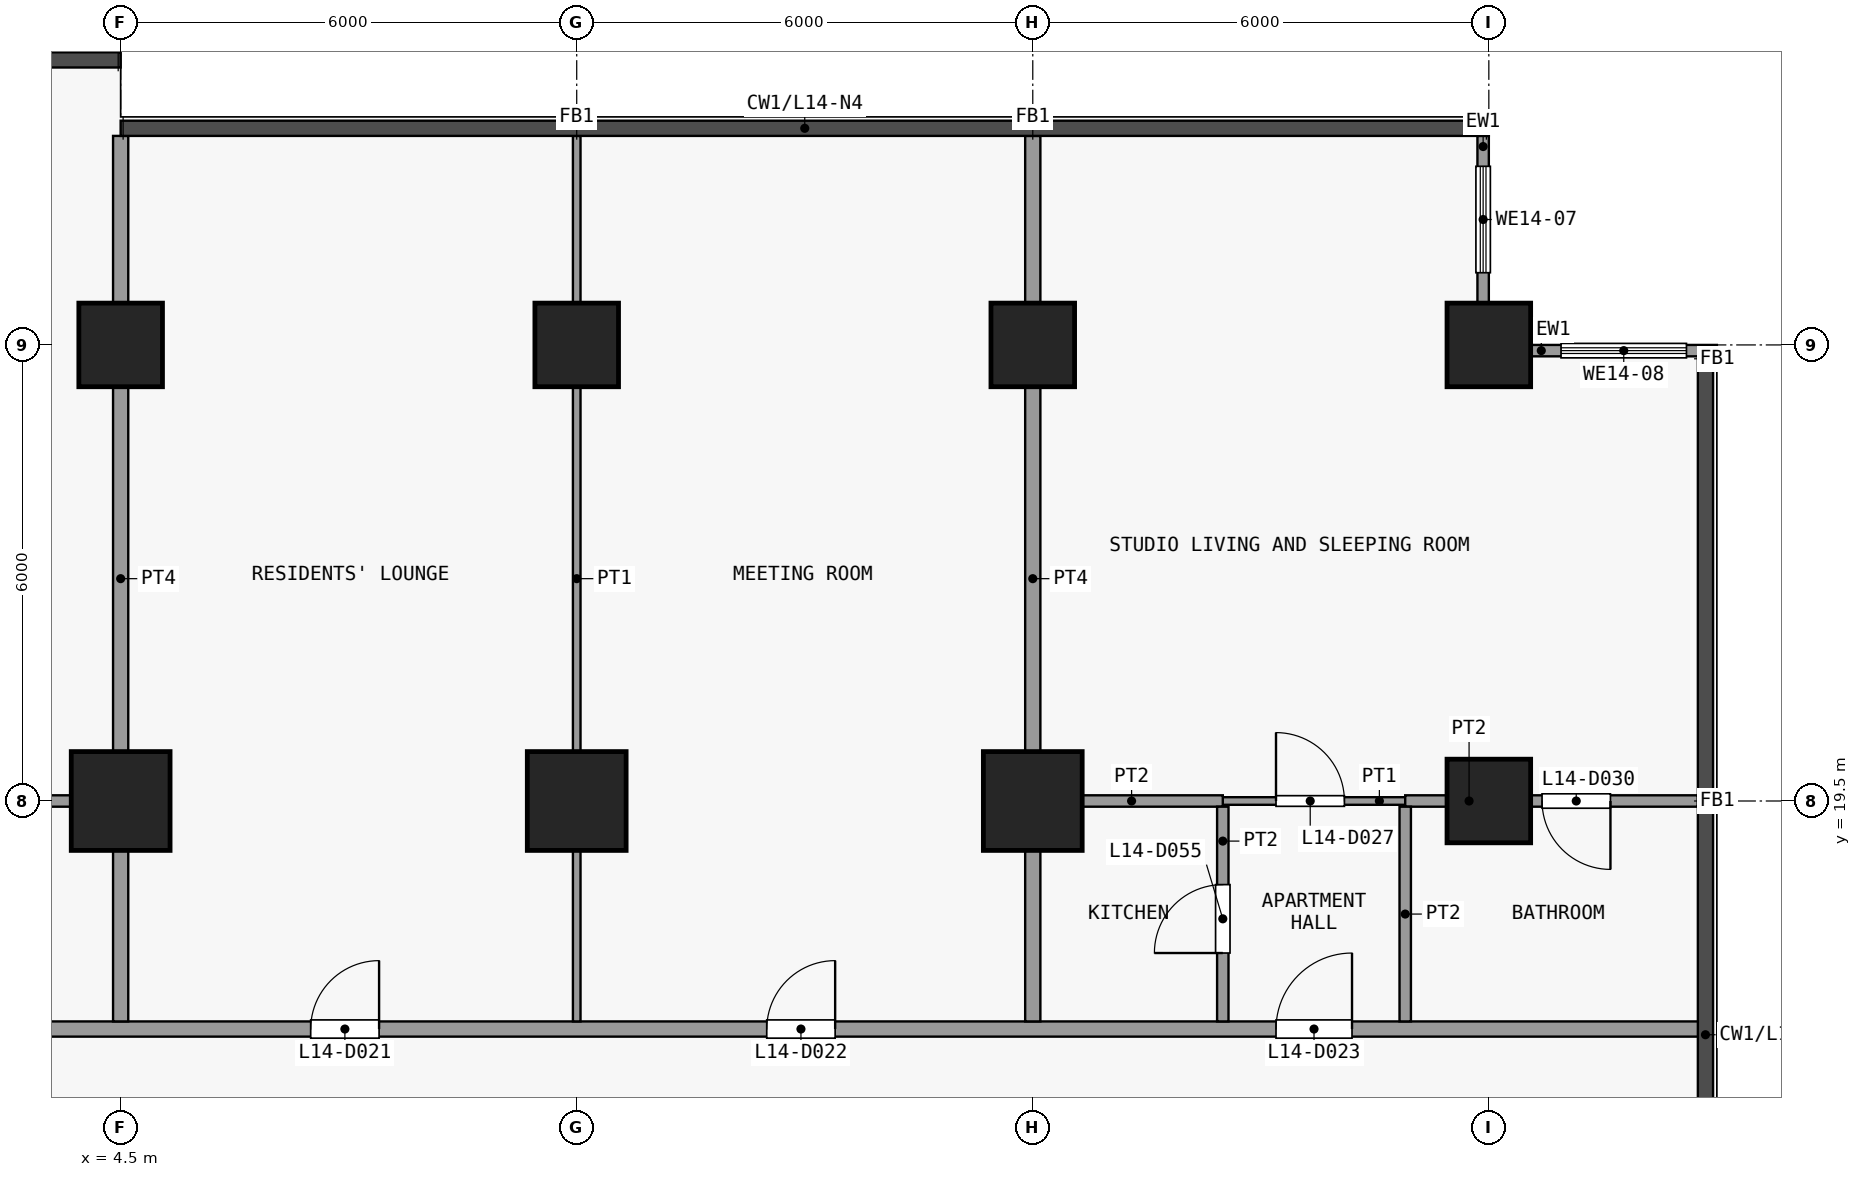
"""IFC4 building model, lengths in metres.
Left out: names, types, materials, properties, quantities, classifications, styles, units other than length and angle.
Written with IfcOpenShell. Run it as: python <this file> out.ifc"""

import sys

from ifc_helpers import new_model, si_unit, direction, frame, frame_2d, origin, origin_2d, place, context, subcontext, project, spatial, rectangle, extrude, element, fill, save


model = new_model("IFC4")
c1 = context("Model", 3, precision=1e-05, world=origin(), true_north=direction((0.0, 1.0)))
c2 = subcontext(c1, "Body", "Model", "MODEL_VIEW")
j1 = project(units=[si_unit("LENGTHUNIT", "METRE"), si_unit("PLANEANGLEUNIT", "RADIAN")], contexts=[c1])
p1 = place(None, origin())
s1 = spatial("IfcSite", under=j1, at=p1, CompositionType="ELEMENT")
p2 = place(p1, origin())
s2 = spatial("IfcBuilding", under=s1, at=p2, CompositionType="ELEMENT")
p3 = place(p2, frame((0.0, 0.0, 61.3)))
s3 = spatial("IfcBuildingStorey", under=s2, at=p3, CompositionType="ELEMENT", Elevation=61.3)
p4 = place(p3, frame((4.5, 19.5, 0.0), z_axis=(0.0, 0.0, 1.0), x_axis=(1.0, 0.0, 0.0)))
e1 = element("IfcColumn", 1, at=p4, inside=s3, PredefinedType="COLUMN", context=c2, shape_type="SweptSolid", body=[
    extrude(rectangle(XDim=1.3, YDim=1.3, at=origin_2d()), origin(), (0.0, 0.0, 1.0), 3.6),
])
p5 = place(p3, frame((4.5, 25.5, 0.0), z_axis=(0.0, 0.0, 1.0), x_axis=(1.0, 0.0, 0.0)))
e2 = element("IfcColumn", 2, at=p5, inside=s3, PredefinedType="COLUMN", context=c2, shape_type="SweptSolid", body=[
    extrude(rectangle(XDim=1.1, YDim=1.1, at=origin_2d()), origin(), (0.0, 0.0, 1.0), 3.6),
])
p6 = place(p3, frame((10.5, 19.5, 0.0), z_axis=(0.0, 0.0, 1.0), x_axis=(1.0, 0.0, 0.0)))
e3 = element("IfcColumn", 3, at=p6, inside=s3, PredefinedType="COLUMN", context=c2, shape_type="SweptSolid", body=[
    extrude(rectangle(XDim=1.3, YDim=1.3, at=origin_2d()), origin(), (0.0, 0.0, 1.0), 3.6),
])
p7 = place(p3, frame((10.5, 25.5, 0.0), z_axis=(0.0, 0.0, 1.0), x_axis=(1.0, 0.0, 0.0)))
e4 = element("IfcColumn", 4, at=p7, inside=s3, PredefinedType="COLUMN", context=c2, shape_type="SweptSolid", body=[
    extrude(rectangle(XDim=1.1, YDim=1.1, at=origin_2d()), origin(), (0.0, 0.0, 1.0), 3.6),
])
p8 = place(p3, frame((16.5, 19.5, 0.0), z_axis=(0.0, 0.0, 1.0), x_axis=(1.0, 0.0, 0.0)))
e5 = element("IfcColumn", 5, at=p8, inside=s3, PredefinedType="COLUMN", context=c2, shape_type="SweptSolid", body=[
    extrude(rectangle(XDim=1.3, YDim=1.3, at=origin_2d()), origin(), (0.0, 0.0, 1.0), 3.6),
])
for number, where, z_axis, x_axis in (
    (6, (16.5, 25.5, 0.0), (0.0, 0.0, 1.0), (1.0, 0.0, 0.0)),
    (7, (22.5, 19.5, 0.0), (0.0, 0.0, 1.0), (1.0, 0.0, 0.0)),
    (8, (22.5, 25.5, 0.0), (0.0, 0.0, 1.0), (1.0, 0.0, 0.0)),
):
    element("IfcColumn", number, at=place(p3, frame(where, z_axis=z_axis, x_axis=x_axis)), inside=s3, PredefinedType="COLUMN", context=c2, shape_type="SweptSolid", body=[
        extrude(rectangle(XDim=1.1, YDim=1.1, at=origin_2d()), origin(), (0.0, 0.0, 1.0), 3.6),
    ])
p9 = place(p3, frame((22.425, 28.25, 0.0), z_axis=(0.0, 0.0, 1.0), x_axis=(0.0, -1.0, 0.0)))
e9 = element("IfcWall", 9, at=p9, inside=s3, PredefinedType="SOLIDWALL", context=c2, shape_type="SweptSolid", body=[
    extrude(rectangle(XDim=2.2, YDim=0.15, at=frame_2d((1.1, 0.0))), origin(), (0.0, 0.0, 1.0), 3.3),
])
p10 = place(p9, frame((0.4, 0.0, 0.9)))
e10 = element("IfcOpeningElement", 10, at=p10, cuts=e9, PredefinedType="OPENING", context=c2, shape_type="SweptSolid", body=[
    extrude(rectangle(XDim=1.4, YDim=2.4, at=frame_2d((0.7, 1.2))), frame((0.0, 0.085, 0.0), z_axis=(0.0, -1.0, 0.0), x_axis=(1.0, 0.0, 0.0)), (0.0, 0.0, 1.0), 0.17),
])
p11 = place(p3, frame((23.05, 25.425, 0.0), z_axis=(0.0, 0.0, 1.0), x_axis=(1.0, 0.0, 0.0)))
e11 = element("IfcWall", 11, at=p11, inside=s3, PredefinedType="SOLIDWALL", context=c2, shape_type="SweptSolid", body=[
    extrude(rectangle(XDim=2.45, YDim=0.15, at=frame_2d((1.225, 0.0))), origin(), (0.0, 0.0, 1.0), 3.3),
])
p12 = place(p11, frame((0.4, 0.0, 0.9)))
e12 = element("IfcOpeningElement", 12, at=p12, cuts=e11, PredefinedType="OPENING", context=c2, shape_type="SweptSolid", body=[
    extrude(rectangle(XDim=1.65, YDim=2.4, at=frame_2d((0.825, 1.2))), frame((0.0, 0.085, 0.0), z_axis=(0.0, -1.0, 0.0), x_axis=(1.0, 0.0, 0.0)), (0.0, 0.0, 1.0), 0.17),
])
p13 = place(p3, frame((-25.35, 16.5, 0.0), z_axis=(0.0, 0.0, 1.0), x_axis=(1.0, 0.0, 0.0)))
e13 = element("IfcWall", 13, at=p13, inside=s3, PredefinedType="PARTITIONING", context=c2, shape_type="SweptSolid", body=[
    extrude(rectangle(XDim=50.7, YDim=0.2, at=frame_2d((25.35, 0.0))), origin(), (0.0, 0.0, 1.0), 3.3),
])
p14 = place(p13, frame((4.55, 0.0, 0.0)))
e14 = element("IfcOpeningElement", 14, at=p14, cuts=e13, PredefinedType="OPENING", context=c2, shape_type="SweptSolid", body=[
    extrude(rectangle(XDim=1.0, YDim=2.1, at=frame_2d((0.5, 1.05))), frame((0.0, 0.11, 0.0), z_axis=(0.0, -1.0, 0.0), x_axis=(1.0, 0.0, 0.0)), (0.0, 0.0, 1.0), 0.22),
])
p15 = place(p13, frame((13.05, 0.0, 0.0)))
e15 = element("IfcOpeningElement", 15, at=p15, cuts=e13, PredefinedType="OPENING", context=c2, shape_type="SweptSolid", body=[
    extrude(rectangle(XDim=1.0, YDim=2.1, at=frame_2d((0.5, 1.05))), frame((0.0, 0.11, 0.0), z_axis=(0.0, -1.0, 0.0), x_axis=(1.0, 0.0, 0.0)), (0.0, 0.0, 1.0), 0.22),
])
p16 = place(p13, frame((24.05, 0.0, 0.0)))
e16 = element("IfcOpeningElement", 16, at=p16, cuts=e13, PredefinedType="OPENING", context=c2, shape_type="SweptSolid", body=[
    extrude(rectangle(XDim=1.0, YDim=2.1, at=frame_2d((0.5, 1.05))), frame((0.0, 0.11, 0.0), z_axis=(0.0, -1.0, 0.0), x_axis=(1.0, 0.0, 0.0)), (0.0, 0.0, 1.0), 0.22),
])
p17 = place(p13, frame((32.35, 0.0, 0.0)))
e17 = element("IfcOpeningElement", 17, at=p17, cuts=e13, PredefinedType="OPENING", context=c2, shape_type="SweptSolid", body=[
    extrude(rectangle(XDim=0.9, YDim=2.1, at=frame_2d((0.45, 1.05))), frame((0.0, 0.11, 0.0), z_axis=(0.0, -1.0, 0.0), x_axis=(1.0, 0.0, 0.0)), (0.0, 0.0, 1.0), 0.22),
])
p18 = place(p13, frame((38.35, 0.0, 0.0)))
e18 = element("IfcOpeningElement", 18, at=p18, cuts=e13, PredefinedType="OPENING", context=c2, shape_type="SweptSolid", body=[
    extrude(rectangle(XDim=0.9, YDim=2.1, at=frame_2d((0.45, 1.05))), frame((0.0, 0.11, 0.0), z_axis=(0.0, -1.0, 0.0), x_axis=(1.0, 0.0, 0.0)), (0.0, 0.0, 1.0), 0.22),
])
p19 = place(p13, frame((45.05, 0.0, 0.0)))
e19 = element("IfcOpeningElement", 19, at=p19, cuts=e13, PredefinedType="OPENING", context=c2, shape_type="SweptSolid", body=[
    extrude(rectangle(XDim=1.0, YDim=2.1, at=frame_2d((0.5, 1.05))), frame((0.0, 0.11, 0.0), z_axis=(0.0, -1.0, 0.0), x_axis=(1.0, 0.0, 0.0)), (0.0, 0.0, 1.0), 0.22),
])
p20 = place(p3, frame((19.0, 19.5, 0.0), z_axis=(0.0, 0.0, 1.0), x_axis=(1.0, 0.0, 0.0)))
e20 = element("IfcWall", 20, at=p20, inside=s3, PredefinedType="PARTITIONING", context=c2, shape_type="SweptSolid", body=[
    extrude(rectangle(XDim=2.4, YDim=0.1, at=frame_2d((1.2, 0.0))), origin(), (0.0, 0.0, 1.0), 3.3),
])
p21 = place(p20, frame((0.7, 0.0, 0.0)))
e21 = element("IfcOpeningElement", 21, at=p21, cuts=e20, PredefinedType="OPENING", context=c2, shape_type="SweptSolid", body=[
    extrude(rectangle(XDim=0.9, YDim=2.1, at=frame_2d((0.45, 1.05))), frame((0.0, 0.06, 0.0), z_axis=(0.0, -1.0, 0.0), x_axis=(1.0, 0.0, 0.0)), (0.0, 0.0, 1.0), 0.12),
])
p22 = place(p3, frame((0.4, 19.5, 0.0), z_axis=(0.0, 0.0, 1.0), x_axis=(1.0, 0.0, 0.0)))
e22 = element("IfcWall", 22, at=p22, inside=s3, PredefinedType="PARTITIONING", context=c2, shape_type="SweptSolid", body=[
    extrude(rectangle(XDim=4.0, YDim=0.15, at=frame_2d((2.0, 0.0))), origin(), (0.0, 0.0, 1.0), 3.3),
])
p23 = place(p22, frame((1.6, 0.0, 0.0)))
e23 = element("IfcOpeningElement", 23, at=p23, cuts=e22, PredefinedType="OPENING", context=c2, shape_type="SweptSolid", body=[
    extrude(rectangle(XDim=0.9, YDim=2.1, at=frame_2d((0.45, 1.05))), frame((0.0, 0.085, 0.0), z_axis=(0.0, -1.0, 0.0), x_axis=(1.0, 0.0, 0.0)), (0.0, 0.0, 1.0), 0.17),
])
p24 = place(p3, frame((16.6, 19.5, 0.0), z_axis=(0.0, 0.0, 1.0), x_axis=(1.0, 0.0, 0.0)))
e24 = element("IfcWall", 24, at=p24, inside=s3, PredefinedType="PARTITIONING", context=c2, shape_type="SweptSolid", body=[
    extrude(rectangle(XDim=2.4, YDim=0.15, at=frame_2d((1.2, 0.0))), origin(), (0.0, 0.0, 1.0), 3.3),
])
p25 = place(p3, frame((21.4, 19.5, 0.0), z_axis=(0.0, 0.0, 1.0), x_axis=(1.0, 0.0, 0.0)))
e25 = element("IfcWall", 25, at=p25, inside=s3, PredefinedType="PARTITIONING", context=c2, shape_type="SweptSolid", body=[
    extrude(rectangle(XDim=3.85, YDim=0.15, at=frame_2d((1.925, 0.0))), origin(), (0.0, 0.0, 1.0), 3.3),
])
p26 = place(p25, frame((1.8, 0.0, 0.0)))
e26 = element("IfcOpeningElement", 26, at=p26, cuts=e25, PredefinedType="OPENING", context=c2, shape_type="SweptSolid", body=[
    extrude(rectangle(XDim=0.9, YDim=2.1, at=frame_2d((0.45, 1.05))), frame((0.0, 0.085, 0.0), z_axis=(0.0, -1.0, 0.0), x_axis=(1.0, 0.0, 0.0)), (0.0, 0.0, 1.0), 0.17),
])
p27 = place(p3, frame((4.5, 16.6, 0.0), z_axis=(0.0, 0.0, 1.0), x_axis=(0.0, 1.0, 0.0)))
e27 = element("IfcWall", 27, at=p27, inside=s3, PredefinedType="PARTITIONING", context=c2, shape_type="SweptSolid", body=[
    extrude(rectangle(XDim=11.65, YDim=0.2, at=frame_2d((5.825, 0.0))), origin(), (0.0, 0.0, 1.0), 3.3),
])
p28 = place(p3, frame((10.5, 16.6, 0.0), z_axis=(0.0, 0.0, 1.0), x_axis=(0.0, 1.0, 0.0)))
e28 = element("IfcWall", 28, at=p28, inside=s3, PredefinedType="PARTITIONING", context=c2, shape_type="SweptSolid", body=[
    extrude(rectangle(XDim=11.65, YDim=0.1, at=frame_2d((5.825, 0.0))), origin(), (0.0, 0.0, 1.0), 3.3),
])
p29 = place(p3, frame((16.5, 16.6, 0.0), z_axis=(0.0, 0.0, 1.0), x_axis=(0.0, 1.0, 0.0)))
e29 = element("IfcWall", 29, at=p29, inside=s3, PredefinedType="PARTITIONING", context=c2, shape_type="SweptSolid", body=[
    extrude(rectangle(XDim=11.65, YDim=0.2, at=frame_2d((5.825, 0.0))), origin(), (0.0, 0.0, 1.0), 3.3),
])
p30 = place(p3, frame((19.0, 16.6, 0.0), z_axis=(0.0, 0.0, 1.0), x_axis=(0.0, 1.0, 0.0)))
e30 = element("IfcWall", 30, at=p30, inside=s3, PredefinedType="PARTITIONING", context=c2, shape_type="SweptSolid", body=[
    extrude(rectangle(XDim=2.825, YDim=0.15, at=frame_2d((1.413, 0.0))), origin(), (0.0, 0.0, 1.0), 3.3),
])
p31 = place(p30, frame((0.9, 0.0, 0.0)))
e31 = element("IfcOpeningElement", 31, at=p31, cuts=e30, PredefinedType="OPENING", context=c2, shape_type="SweptSolid", body=[
    extrude(rectangle(XDim=0.9, YDim=2.1, at=frame_2d((0.45, 1.05))), frame((0.0, 0.085, 0.0), z_axis=(0.0, -1.0, 0.0), x_axis=(1.0, 0.0, 0.0)), (0.0, 0.0, 1.0), 0.17),
])
p32 = place(p3, frame((21.4, 16.6, 0.0), z_axis=(0.0, 0.0, 1.0), x_axis=(0.0, 1.0, 0.0)))
e32 = element("IfcWall", 32, at=p32, inside=s3, PredefinedType="PARTITIONING", context=c2, shape_type="SweptSolid", body=[
    extrude(rectangle(XDim=2.825, YDim=0.15, at=frame_2d((1.413, 0.0))), origin(), (0.0, 0.0, 1.0), 3.3),
])
p33 = place(p10, origin())
e33 = element("IfcWindow", 33, at=p33, inside=s3, PartitioningType="SINGLE_PANEL", PredefinedType="WINDOW", context=c2, shape_type="SweptSolid", body=[
    extrude(rectangle(XDim=1.4, YDim=2.4, at=frame_2d((0.7, 1.2))), frame((0.0, 0.03, 0.0), z_axis=(0.0, -1.0, 0.0), x_axis=(1.0, 0.0, 0.0)), (0.0, 0.0, 1.0), 0.06),
])
fill(e10, e33)
p34 = place(p12, origin())
e34 = element("IfcWindow", 34, at=p34, inside=s3, PartitioningType="SINGLE_PANEL", PredefinedType="WINDOW", context=c2, shape_type="SweptSolid", body=[
    extrude(rectangle(XDim=1.65, YDim=2.4, at=frame_2d((0.825, 1.2))), frame((0.0, 0.03, 0.0), z_axis=(0.0, -1.0, 0.0), x_axis=(1.0, 0.0, 0.0)), (0.0, 0.0, 1.0), 0.06),
])
fill(e12, e34)
p35 = place(p17, origin())
e35 = element("IfcDoor", 35, at=p35, inside=s3, OperationType="SINGLE_SWING_LEFT", PredefinedType="DOOR", context=c2, shape_type="SweptSolid", body=[
    extrude(rectangle(XDim=0.9, YDim=2.1, at=frame_2d((0.45, 1.05))), frame((0.0, 0.025, 0.0), z_axis=(0.0, -1.0, 0.0), x_axis=(1.0, 0.0, 0.0)), (0.0, 0.0, 1.0), 0.05),
])
fill(e17, e35)
p36 = place(p18, origin())
e36 = element("IfcDoor", 36, at=p36, inside=s3, OperationType="SINGLE_SWING_LEFT", PredefinedType="DOOR", context=c2, shape_type="SweptSolid", body=[
    extrude(rectangle(XDim=0.9, YDim=2.1, at=frame_2d((0.45, 1.05))), frame((0.0, 0.025, 0.0), z_axis=(0.0, -1.0, 0.0), x_axis=(1.0, 0.0, 0.0)), (0.0, 0.0, 1.0), 0.05),
])
fill(e18, e36)
p37 = place(p19, origin())
e37 = element("IfcDoor", 37, at=p37, inside=s3, OperationType="SINGLE_SWING_LEFT", PredefinedType="DOOR", context=c2, shape_type="SweptSolid", body=[
    extrude(rectangle(XDim=1.0, YDim=2.1, at=frame_2d((0.5, 1.05))), frame((0.0, 0.025, 0.0), z_axis=(0.0, -1.0, 0.0), x_axis=(1.0, 0.0, 0.0)), (0.0, 0.0, 1.0), 0.05),
])
fill(e19, e37)
p38 = place(p21, origin())
e38 = element("IfcDoor", 38, at=p38, inside=s3, OperationType="SINGLE_SWING_RIGHT", PredefinedType="DOOR", context=c2, shape_type="SweptSolid", body=[
    extrude(rectangle(XDim=0.9, YDim=2.1, at=frame_2d((0.45, 1.05))), frame((0.0, 0.025, 0.0), z_axis=(0.0, -1.0, 0.0), x_axis=(1.0, 0.0, 0.0)), (0.0, 0.0, 1.0), 0.05),
])
fill(e21, e38)
p39 = place(p26, origin())
e39 = element("IfcDoor", 39, at=p39, inside=s3, OperationType="SINGLE_SWING_RIGHT", PredefinedType="DOOR", context=c2, shape_type="SweptSolid", body=[
    extrude(rectangle(XDim=0.9, YDim=2.1, at=frame_2d((0.45, 1.05))), frame((0.0, 0.025, 0.0), z_axis=(0.0, -1.0, 0.0), x_axis=(1.0, 0.0, 0.0)), (0.0, 0.0, 1.0), 0.05),
])
fill(e26, e39)
p40 = place(p31, origin())
e40 = element("IfcDoor", 40, at=p40, inside=s3, OperationType="SINGLE_SWING_RIGHT", PredefinedType="DOOR", context=c2, shape_type="SweptSolid", body=[
    extrude(rectangle(XDim=0.9, YDim=2.1, at=frame_2d((0.45, 1.05))), frame((0.0, 0.025, 0.0), z_axis=(0.0, -1.0, 0.0), x_axis=(1.0, 0.0, 0.0)), (0.0, 0.0, 1.0), 0.05),
])
fill(e31, e40)
save(model, sys.argv[1])
